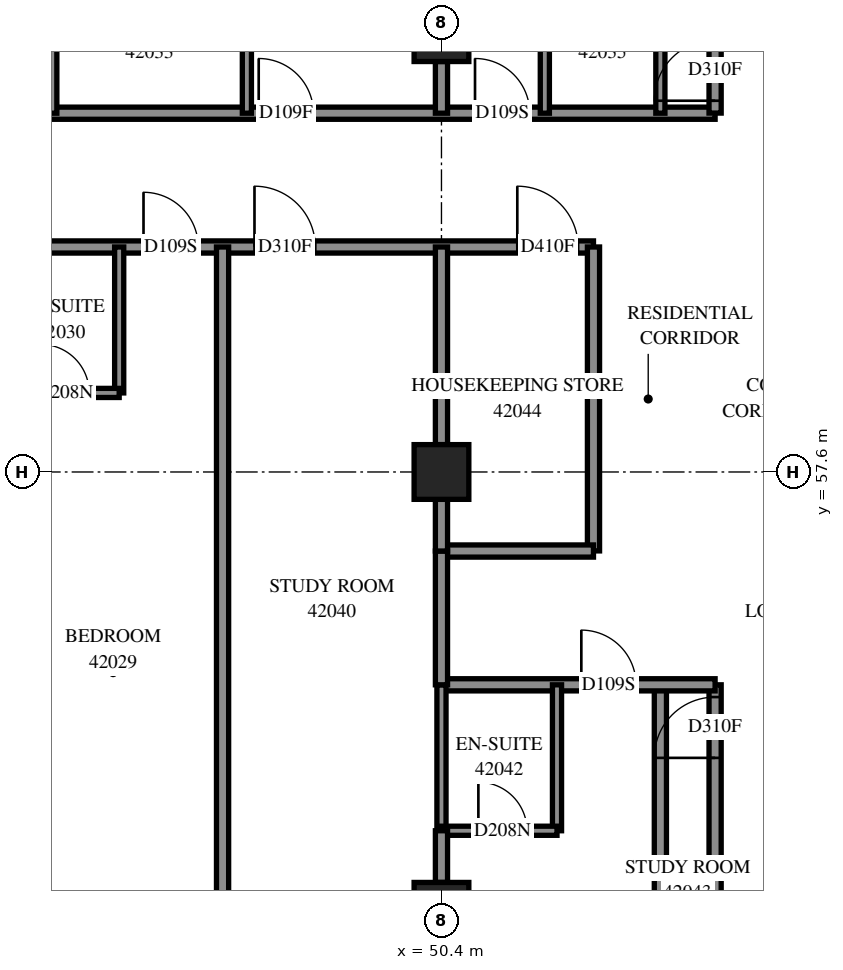
"""IFC4 building model, lengths in metres.
Left out: names, types, materials, properties, quantities, classifications, styles, units other than length and angle.
Written with IfcOpenShell. Run it as: python <this file> out.ifc"""

import sys

from ifc_helpers import new_model, si_unit, direction, frame, frame_2d, origin, origin_2d, place, context, subcontext, project, spatial, rectangle, extrude, element, fill, save


model = new_model("IFC4")
c1 = context("Model", 3, precision=1e-05, world=origin(), true_north=direction((0.0, 1.0)))
c2 = subcontext(c1, "Body", "Model", "MODEL_VIEW")
j1 = project(units=[si_unit("LENGTHUNIT", "METRE"), si_unit("PLANEANGLEUNIT", "RADIAN")], contexts=[c1])
p1 = place(None, origin())
s1 = spatial("IfcSite", under=j1, at=p1, CompositionType="ELEMENT")
p2 = place(p1, origin())
s2 = spatial("IfcBuilding", under=s1, at=p2, CompositionType="ELEMENT")
p3 = place(p2, frame((0.0, 0.0, 155.8)))
s3 = spatial("IfcBuildingStorey", under=s2, at=p3, CompositionType="ELEMENT", Elevation=155.8)
for number, where, z_axis, x_axis in (
    (1, (50.4, 50.4, 0.0), (0.0, 0.0, 1.0), (1.0, 0.0, 0.0)),
    (2, (50.4, 57.6, 0.0), (0.0, 0.0, 1.0), (1.0, 0.0, 0.0)),
    (3, (50.4, 64.8, 0.0), (0.0, 0.0, 1.0), (1.0, 0.0, 0.0)),
):
    element("IfcColumn", number, at=place(p3, frame(where, z_axis=z_axis, x_axis=x_axis)), inside=s3, PredefinedType="COLUMN", context=c2, shape_type="SweptSolid", body=[
        extrude(rectangle(XDim=0.9, YDim=0.9, at=origin_2d()), origin(), (0.0, 0.0, 1.0), 3.1),
    ])
p4 = place(p3, frame((36.0, 61.3, 0.0), z_axis=(0.0, 0.0, 1.0), x_axis=(1.0, 0.0, 0.0)))
e4 = element("IfcWall", 4, at=p4, inside=s3, PredefinedType="PARTITIONING", context=c2, shape_type="SweptSolid", body=[
    extrude(rectangle(XDim=16.9, YDim=0.2, at=frame_2d((8.45, 0.0))), origin(), (0.0, 0.0, 1.0), 3.1),
])
p5 = place(p4, frame((2.3, 0.0, 0.0)))
e5 = element("IfcOpeningElement", 5, at=p5, cuts=e4, PredefinedType="OPENING", context=c2, shape_type="SweptSolid", body=[
    extrude(rectangle(XDim=0.9, YDim=2.1, at=frame_2d((0.45, 1.05))), frame((0.0, 0.11, 0.0), z_axis=(0.0, -1.0, 0.0), x_axis=(1.0, 0.0, 0.0)), (0.0, 0.0, 1.0), 0.22),
])
p6 = place(p4, frame((4.125, 0.0, 0.0)))
e6 = element("IfcOpeningElement", 6, at=p6, cuts=e4, PredefinedType="OPENING", context=c2, shape_type="SweptSolid", body=[
    extrude(rectangle(XDim=1.0, YDim=2.1, at=frame_2d((0.5, 1.05))), frame((0.0, 0.11, 0.0), z_axis=(0.0, -1.0, 0.0), x_axis=(1.0, 0.0, 0.0)), (0.0, 0.0, 1.0), 0.22),
])
p7 = place(p4, frame((9.5, 0.0, 0.0)))
e7 = element("IfcOpeningElement", 7, at=p7, cuts=e4, PredefinedType="OPENING", context=c2, shape_type="SweptSolid", body=[
    extrude(rectangle(XDim=0.9, YDim=2.1, at=frame_2d((0.45, 1.05))), frame((0.0, 0.11, 0.0), z_axis=(0.0, -1.0, 0.0), x_axis=(1.0, 0.0, 0.0)), (0.0, 0.0, 1.0), 0.22),
])
p8 = place(p4, frame((11.325, 0.0, 0.0)))
e8 = element("IfcOpeningElement", 8, at=p8, cuts=e4, PredefinedType="OPENING", context=c2, shape_type="SweptSolid", body=[
    extrude(rectangle(XDim=1.0, YDim=2.1, at=frame_2d((0.5, 1.05))), frame((0.0, 0.11, 0.0), z_axis=(0.0, -1.0, 0.0), x_axis=(1.0, 0.0, 0.0)), (0.0, 0.0, 1.0), 0.22),
])
p9 = place(p4, frame((15.647, 0.0, 0.0)))
e9 = element("IfcOpeningElement", 9, at=p9, cuts=e4, PredefinedType="OPENING", context=c2, shape_type="SweptSolid", body=[
    extrude(rectangle(XDim=1.0, YDim=2.1, at=frame_2d((0.5, 1.05))), frame((0.0, 0.11, 0.0), z_axis=(0.0, -1.0, 0.0), x_axis=(1.0, 0.0, 0.0)), (0.0, 0.0, 1.0), 0.22),
])
p10 = place(p3, frame((40.702, 63.5, 0.0), z_axis=(0.0, 0.0, 1.0), x_axis=(1.0, 0.0, 0.0)))
e10 = element("IfcWall", 10, at=p10, inside=s3, PredefinedType="PARTITIONING", context=c2, shape_type="SweptSolid", body=[
    extrude(rectangle(XDim=14.198, YDim=0.2, at=frame_2d((7.099, 0.0))), origin(), (0.0, 0.0, 1.0), 3.1),
])
p11 = place(p10, frame((6.692, 0.0, 0.0)))
e11 = element("IfcOpeningElement", 11, at=p11, cuts=e10, PredefinedType="OPENING", context=c2, shape_type="SweptSolid", body=[
    extrude(rectangle(XDim=0.9, YDim=2.1, at=frame_2d((0.45, 1.05))), frame((0.0, 0.11, 0.0), z_axis=(0.0, -1.0, 0.0), x_axis=(1.0, 0.0, 0.0)), (0.0, 0.0, 1.0), 0.22),
])
p12 = place(p10, frame((10.25, 0.0, 0.0)))
e12 = element("IfcOpeningElement", 12, at=p12, cuts=e10, PredefinedType="OPENING", context=c2, shape_type="SweptSolid", body=[
    extrude(rectangle(XDim=0.9, YDim=2.1, at=frame_2d((0.45, 1.05))), frame((0.0, 0.11, 0.0), z_axis=(0.0, -1.0, 0.0), x_axis=(1.0, 0.0, 0.0)), (0.0, 0.0, 1.0), 0.22),
])
p13 = place(p3, frame((54.0, 42.309, 0.0), z_axis=(0.0, 0.0, 1.0), x_axis=(0.0, 1.0, 0.0)))
e13 = element("IfcWall", 13, at=p13, inside=s3, PredefinedType="PARTITIONING", context=c2, shape_type="SweptSolid", body=[
    extrude(rectangle(XDim=11.791, YDim=0.2, at=frame_2d((5.895, 0.0))), origin(), (0.0, 0.0, 1.0), 3.1),
])
p14 = place(p3, frame((46.8, 49.7, 0.0), z_axis=(0.0, 0.0, 1.0), x_axis=(0.0, 1.0, 0.0)))
e14 = element("IfcWall", 14, at=p14, inside=s3, PredefinedType="PARTITIONING", context=c2, shape_type="SweptSolid", body=[
    extrude(rectangle(XDim=11.6, YDim=0.2, at=frame_2d((5.8, 0.0))), origin(), (0.0, 0.0, 1.0), 3.1),
])
p15 = place(p3, frame((54.9, 47.7, 0.0), z_axis=(0.0, 0.0, 1.0), x_axis=(0.0, 1.0, 0.0)))
e15 = element("IfcWall", 15, at=p15, inside=s3, PredefinedType="PARTITIONING", context=c2, shape_type="SweptSolid", body=[
    extrude(rectangle(XDim=6.4, YDim=0.2, at=frame_2d((3.2, 0.0))), origin(), (0.0, 0.0, 1.0), 3.1),
])
p16 = place(p15, frame((5.199, 0.0, 0.0)))
e16 = element("IfcOpeningElement", 16, at=p16, cuts=e15, PredefinedType="OPENING", context=c2, shape_type="SweptSolid", body=[
    extrude(rectangle(XDim=1.0, YDim=2.1, at=frame_2d((0.5, 1.05))), frame((0.0, 0.11, 0.0), z_axis=(0.0, -1.0, 0.0), x_axis=(1.0, 0.0, 0.0)), (0.0, 0.0, 1.0), 0.22),
])
p17 = place(p3, frame((52.9, 56.302, 0.0), z_axis=(0.0, 0.0, 1.0), x_axis=(0.0, 1.0, 0.0)))
e17 = element("IfcWall", 17, at=p17, inside=s3, PredefinedType="PARTITIONING", context=c2, shape_type="SweptSolid", body=[
    extrude(rectangle(XDim=4.998, YDim=0.2, at=frame_2d((2.499, 0.0))), origin(), (0.0, 0.0, 1.0), 3.1),
])
p18 = place(p3, frame((50.4, 54.1, 0.0), z_axis=(0.0, 0.0, 1.0), x_axis=(1.0, 0.0, 0.0)))
e18 = element("IfcWall", 18, at=p18, inside=s3, PredefinedType="PARTITIONING", context=c2, shape_type="SweptSolid", body=[
    extrude(rectangle(XDim=4.5, YDim=0.2, at=frame_2d((2.25, 0.0))), origin(), (0.0, 0.0, 1.0), 3.1),
])
p19 = place(p18, frame((2.3, 0.0, 0.0)))
e19 = element("IfcOpeningElement", 19, at=p19, cuts=e18, PredefinedType="OPENING", context=c2, shape_type="SweptSolid", body=[
    extrude(rectangle(XDim=0.9, YDim=2.1, at=frame_2d((0.45, 1.05))), frame((0.0, 0.11, 0.0), z_axis=(0.0, -1.0, 0.0), x_axis=(1.0, 0.0, 0.0)), (0.0, 0.0, 1.0), 0.22),
])
p20 = place(p3, frame((54.9, 63.502, 0.0), z_axis=(0.0, 0.0, 1.0), x_axis=(0.0, 1.0, 0.0)))
e20 = element("IfcWall", 20, at=p20, inside=s3, PredefinedType="PARTITIONING", context=c2, shape_type="SweptSolid", body=[
    extrude(rectangle(XDim=3.998, YDim=0.2, at=frame_2d((1.999, 0.0))), origin(), (0.0, 0.0, 1.0), 3.1),
])
p21 = place(p20, frame((0.203, 0.0, 0.0)))
e21 = element("IfcOpeningElement", 21, at=p21, cuts=e20, PredefinedType="OPENING", context=c2, shape_type="SweptSolid", body=[
    extrude(rectangle(XDim=1.0, YDim=2.1, at=frame_2d((0.5, 1.05))), frame((0.0, 0.11, 0.0), z_axis=(0.0, -1.0, 0.0), x_axis=(1.0, 0.0, 0.0)), (0.0, 0.0, 1.0), 0.22),
])
p22 = place(p3, frame((50.4, 58.05, 0.0), z_axis=(0.0, 0.0, 1.0), x_axis=(0.0, 1.0, 0.0)))
e22 = element("IfcWall", 22, at=p22, inside=s3, PredefinedType="PARTITIONING", context=c2, shape_type="SweptSolid", body=[
    extrude(rectangle(XDim=3.25, YDim=0.2, at=frame_2d((1.625, 0.0))), origin(), (0.0, 0.0, 1.0), 3.1),
])
p23 = place(p3, frame((50.4, 56.3, 0.0), z_axis=(0.0, 0.0, 1.0), x_axis=(1.0, 0.0, 0.0)))
e23 = element("IfcWall", 23, at=p23, inside=s3, PredefinedType="PARTITIONING", context=c2, shape_type="SweptSolid", body=[
    extrude(rectangle(XDim=2.5, YDim=0.2, at=frame_2d((1.25, 0.0))), origin(), (0.0, 0.0, 1.0), 3.1),
])
for number, where, z_axis, x_axis in (
    (24, (44.0, 63.5, 0.0), (0.0, 0.0, 1.0), (0.0, 1.0, 0.0)),
    (25, (47.2, 63.5, 0.0), (0.0, 0.0, 1.0), (0.0, 1.0, 0.0)),
    (26, (52.1, 63.5, 0.0), (0.0, 0.0, 1.0), (0.0, 1.0, 0.0)),
    (27, (54.0, 63.5, 0.0), (0.0, 0.0, 1.0), (0.0, 1.0, 0.0)),
    (28, (45.1, 58.9, 0.0), (0.0, 0.0, 1.0), (0.0, 1.0, 0.0)),
    (29, (52.3, 51.7, 0.0), (0.0, 0.0, 1.0), (0.0, 1.0, 0.0)),
    (30, (50.4, 51.7, 0.0), (0.0, 0.0, 1.0), (0.0, 1.0, 0.0)),
):
    element("IfcWall", number, at=place(p3, frame(where, z_axis=z_axis, x_axis=x_axis)), inside=s3, PredefinedType="PARTITIONING", context=c2, shape_type="SweptSolid", body=[
        extrude(rectangle(XDim=2.4, YDim=0.15, at=frame_2d((1.2, 0.0))), origin(), (0.0, 0.0, 1.0), 3.1),
    ])
p24 = place(p3, frame((50.4, 54.1, 0.0), z_axis=(0.0, 0.0, 1.0), x_axis=(0.0, 1.0, 0.0)))
e31 = element("IfcWall", 31, at=p24, inside=s3, PredefinedType="PARTITIONING", context=c2, shape_type="SweptSolid", body=[
    extrude(rectangle(XDim=2.2, YDim=0.2, at=frame_2d((1.1, 0.0))), origin(), (0.0, 0.0, 1.0), 3.1),
])
p25 = place(p3, frame((43.2, 58.9, 0.0), z_axis=(0.0, 0.0, 1.0), x_axis=(1.0, 0.0, 0.0)))
e32 = element("IfcWall", 32, at=p25, inside=s3, PredefinedType="PARTITIONING", context=c2, shape_type="SweptSolid", body=[
    extrude(rectangle(XDim=1.9, YDim=0.15, at=frame_2d((0.95, 0.0))), origin(), (0.0, 0.0, 1.0), 3.1),
])
p26 = place(p25, frame((0.607, 0.0, 0.0)))
e33 = element("IfcOpeningElement", 33, at=p26, cuts=e32, PredefinedType="OPENING", context=c2, shape_type="SweptSolid", body=[
    extrude(rectangle(XDim=0.8, YDim=2.1, at=frame_2d((0.4, 1.05))), frame((0.0, 0.085, 0.0), z_axis=(0.0, -1.0, 0.0), x_axis=(1.0, 0.0, 0.0)), (0.0, 0.0, 1.0), 0.17),
])
p27 = place(p3, frame((50.4, 51.7, 0.0), z_axis=(0.0, 0.0, 1.0), x_axis=(1.0, 0.0, 0.0)))
e34 = element("IfcWall", 34, at=p27, inside=s3, PredefinedType="PARTITIONING", context=c2, shape_type="SweptSolid", body=[
    extrude(rectangle(XDim=1.9, YDim=0.15, at=frame_2d((0.95, 0.0))), origin(), (0.0, 0.0, 1.0), 3.1),
])
p28 = place(p27, frame((0.607, 0.0, 0.0)))
e35 = element("IfcOpeningElement", 35, at=p28, cuts=e34, PredefinedType="OPENING", context=c2, shape_type="SweptSolid", body=[
    extrude(rectangle(XDim=0.8, YDim=2.1, at=frame_2d((0.4, 1.05))), frame((0.0, 0.085, 0.0), z_axis=(0.0, -1.0, 0.0), x_axis=(1.0, 0.0, 0.0)), (0.0, 0.0, 1.0), 0.17),
])
for number, where, z_axis, x_axis in (
    (36, (50.4, 50.85, 0.0), (0.0, 0.0, 1.0), (0.0, 1.0, 0.0)),
    (37, (50.4, 56.3, 0.0), (0.0, 0.0, 1.0), (0.0, 1.0, 0.0)),
    (38, (50.4, 63.5, 0.0), (0.0, 0.0, 1.0), (0.0, 1.0, 0.0)),
):
    element("IfcWall", number, at=place(p3, frame(where, z_axis=z_axis, x_axis=x_axis)), inside=s3, PredefinedType="PARTITIONING", context=c2, shape_type="SweptSolid", body=[
        extrude(rectangle(XDim=0.85, YDim=0.2, at=frame_2d((0.425, 0.0))), origin(), (0.0, 0.0, 1.0), 3.1),
    ])
p29 = place(p7, origin())
e39 = element("IfcDoor", 39, at=p29, inside=s3, OperationType="SINGLE_SWING_LEFT", PredefinedType="DOOR", context=c2, shape_type="SweptSolid", body=[
    extrude(rectangle(XDim=0.9, YDim=2.1, at=frame_2d((0.45, 1.05))), frame((0.0, 0.025, 0.0), z_axis=(0.0, -1.0, 0.0), x_axis=(1.0, 0.0, 0.0)), (0.0, 0.0, 1.0), 0.05),
])
fill(e7, e39)
p30 = place(p26, origin())
e40 = element("IfcDoor", 40, at=p30, inside=s3, OperationType="SINGLE_SWING_RIGHT", PredefinedType="DOOR", context=c2, shape_type="SweptSolid", body=[
    extrude(rectangle(XDim=0.8, YDim=2.1, at=frame_2d((0.4, 1.05))), frame((0.0, 0.025, 0.0), z_axis=(0.0, -1.0, 0.0), x_axis=(1.0, 0.0, 0.0)), (0.0, 0.0, 1.0), 0.05),
])
fill(e33, e40)
p31 = place(p11, origin())
e41 = element("IfcDoor", 41, at=p31, inside=s3, OperationType="SINGLE_SWING_RIGHT", PredefinedType="DOOR", context=c2, shape_type="SweptSolid", body=[
    extrude(rectangle(XDim=0.9, YDim=2.1, at=frame_2d((0.45, 1.05))), frame((0.0, 0.025, 0.0), z_axis=(0.0, -1.0, 0.0), x_axis=(1.0, 0.0, 0.0)), (0.0, 0.0, 1.0), 0.05),
])
fill(e11, e41)
p32 = place(p12, origin())
e42 = element("IfcDoor", 42, at=p32, inside=s3, OperationType="SINGLE_SWING_RIGHT", PredefinedType="DOOR", context=c2, shape_type="SweptSolid", body=[
    extrude(rectangle(XDim=0.9, YDim=2.1, at=frame_2d((0.45, 1.05))), frame((0.0, 0.025, 0.0), z_axis=(0.0, -1.0, 0.0), x_axis=(1.0, 0.0, 0.0)), (0.0, 0.0, 1.0), 0.05),
])
fill(e12, e42)
p33 = place(p21, origin())
e43 = element("IfcDoor", 43, at=p33, inside=s3, OperationType="SINGLE_SWING_LEFT", PredefinedType="DOOR", context=c2, shape_type="SweptSolid", body=[
    extrude(rectangle(XDim=1.0, YDim=2.1, at=frame_2d((0.5, 1.05))), frame((0.0, 0.025, 0.0), z_axis=(0.0, -1.0, 0.0), x_axis=(1.0, 0.0, 0.0)), (0.0, 0.0, 1.0), 0.05),
])
fill(e21, e43)
p34 = place(p8, origin())
e44 = element("IfcDoor", 44, at=p34, inside=s3, OperationType="SINGLE_SWING_RIGHT", PredefinedType="DOOR", context=c2, shape_type="SweptSolid", body=[
    extrude(rectangle(XDim=1.0, YDim=2.1, at=frame_2d((0.5, 1.05))), frame((0.0, 0.025, 0.0), z_axis=(0.0, -1.0, 0.0), x_axis=(1.0, 0.0, 0.0)), (0.0, 0.0, 1.0), 0.05),
])
fill(e8, e44)
p35 = place(p19, origin())
e45 = element("IfcDoor", 45, at=p35, inside=s3, OperationType="SINGLE_SWING_LEFT", PredefinedType="DOOR", context=c2, shape_type="SweptSolid", body=[
    extrude(rectangle(XDim=0.9, YDim=2.1, at=frame_2d((0.45, 1.05))), frame((0.0, 0.025, 0.0), z_axis=(0.0, -1.0, 0.0), x_axis=(1.0, 0.0, 0.0)), (0.0, 0.0, 1.0), 0.05),
])
fill(e19, e45)
p36 = place(p28, origin())
e46 = element("IfcDoor", 46, at=p36, inside=s3, OperationType="SINGLE_SWING_RIGHT", PredefinedType="DOOR", context=c2, shape_type="SweptSolid", body=[
    extrude(rectangle(XDim=0.8, YDim=2.1, at=frame_2d((0.4, 1.05))), frame((0.0, 0.025, 0.0), z_axis=(0.0, -1.0, 0.0), x_axis=(1.0, 0.0, 0.0)), (0.0, 0.0, 1.0), 0.05),
])
fill(e35, e46)
p37 = place(p16, origin())
e47 = element("IfcDoor", 47, at=p37, inside=s3, OperationType="SINGLE_SWING_RIGHT", PredefinedType="DOOR", context=c2, shape_type="SweptSolid", body=[
    extrude(rectangle(XDim=1.0, YDim=2.1, at=frame_2d((0.5, 1.05))), frame((0.0, 0.025, 0.0), z_axis=(0.0, -1.0, 0.0), x_axis=(1.0, 0.0, 0.0)), (0.0, 0.0, 1.0), 0.05),
])
fill(e16, e47)
p38 = place(p9, origin())
e48 = element("IfcDoor", 48, at=p38, inside=s3, OperationType="SINGLE_SWING_LEFT", PredefinedType="DOOR", context=c2, shape_type="SweptSolid", body=[
    extrude(rectangle(XDim=1.0, YDim=2.1, at=frame_2d((0.5, 1.05))), frame((0.0, 0.025, 0.0), z_axis=(0.0, -1.0, 0.0), x_axis=(1.0, 0.0, 0.0)), (0.0, 0.0, 1.0), 0.05),
])
fill(e9, e48)
save(model, sys.argv[1])
